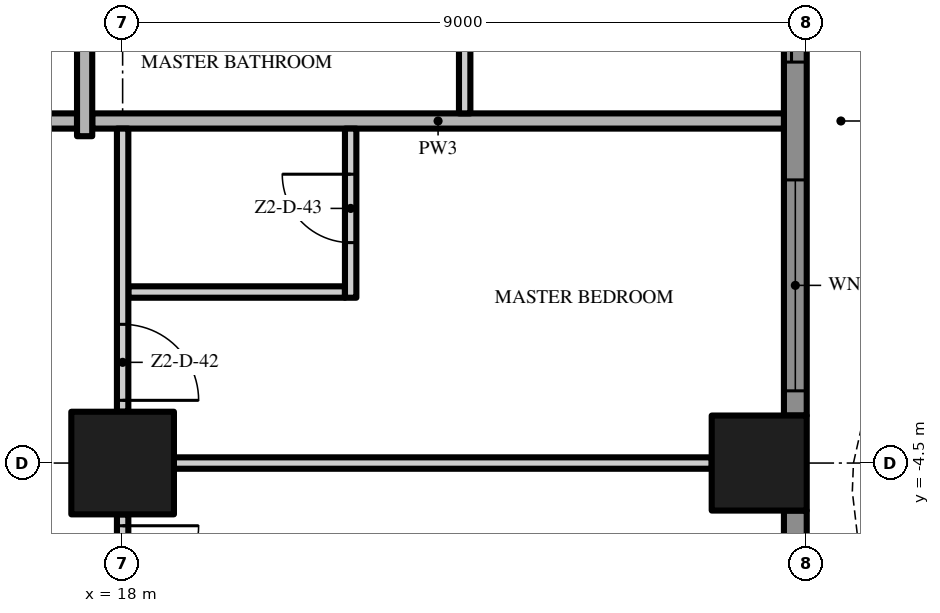
"""IFC4 building model, lengths in metres.
Left out: names, types, materials, properties, quantities, classifications, styles, units other than length and angle.
Written with IfcOpenShell. Run it as: python <this file> out.ifc"""

import sys

from ifc_helpers import new_model, si_unit, direction, frame, frame_2d, origin, origin_2d, place, context, subcontext, project, spatial, polyline, rectangle, outline, extrude, element, fill, save


model = new_model("IFC4")
c1 = context("Model", 3, precision=1e-05, world=origin(), true_north=direction((0.0, 1.0)))
c2 = subcontext(c1, "Body", "Model", "MODEL_VIEW")
j1 = project(units=[si_unit("LENGTHUNIT", "METRE"), si_unit("PLANEANGLEUNIT", "RADIAN")], contexts=[c1])
p1 = place(None, origin())
s1 = spatial("IfcSite", under=j1, at=p1, CompositionType="ELEMENT")
p2 = place(p1, origin())
s2 = spatial("IfcBuilding", under=s1, at=p2, CompositionType="ELEMENT")
p3 = place(p2, frame((0.0, 0.0, 103.6)))
s3 = spatial("IfcBuildingStorey", under=s2, at=p3, CompositionType="ELEMENT", Elevation=103.6)
p4 = place(p3, frame((18.0, -4.5, 0.0), z_axis=(0.0, 0.0, 1.0), x_axis=(1.0, 0.0, 0.0)))
e1 = element("IfcColumn", 1, at=p4, inside=s3, PredefinedType="COLUMN", context=c2, shape_type="SweptSolid", body=[
    extrude(rectangle(XDim=1.35, YDim=1.35, at=origin_2d()), origin(), (0.0, 0.0, 1.0), 3.5),
])
p5 = place(p3, frame((26.375, -4.5, 0.0), z_axis=(0.0, 0.0, 1.0), x_axis=(1.0, 0.0, 0.0)))
e2 = element("IfcColumn", 2, at=p5, inside=s3, PredefinedType="COLUMN", context=c2, shape_type="SweptSolid", body=[
    extrude(rectangle(XDim=1.25, YDim=1.25, at=origin_2d()), origin(), (0.0, 0.0, 1.0), 3.5),
])
p6 = place(p3, frame((26.85, -5.125, 0.0), z_axis=(0.0, 0.0, 1.0), x_axis=(0.0, -1.0, 0.0)))
e3 = element("IfcWall", 3, at=p6, inside=s3, PredefinedType="SOLIDWALL", context=c2, shape_type="SweptSolid", body=[
    extrude(rectangle(XDim=7.75, YDim=0.3, at=frame_2d((3.875, 0.0))), origin(), (0.0, 0.0, 1.0), 3.5),
])
p7 = place(p6, frame((4.65, 0.0, 0.0)))
e4 = element("IfcOpeningElement", 4, at=p7, cuts=e3, PredefinedType="OPENING", context=c2, shape_type="SweptSolid", body=[
    extrude(rectangle(XDim=2.775, YDim=2.4, at=frame_2d((1.387, 1.2))), frame((0.0, 0.16, 0.0), z_axis=(0.0, -1.0, 0.0), x_axis=(1.0, 0.0, 0.0)), (0.0, 0.0, 1.0), 0.32),
])
p8 = place(p6, frame((0.325, 0.0, 0.45)))
e5 = element("IfcOpeningElement", 5, at=p8, cuts=e3, PredefinedType="OPENING", context=c2, shape_type="SweptSolid", body=[
    extrude(rectangle(XDim=2.775, YDim=2.65, at=frame_2d((1.387, 1.325))), frame((0.0, 0.16, 0.0), z_axis=(0.0, -1.0, 0.0), x_axis=(1.0, 0.0, 0.0)), (0.0, 0.0, 1.0), 0.32),
])
p9 = place(p3, frame((26.85, 3.875, 0.0), z_axis=(0.0, 0.0, 1.0), x_axis=(0.0, -1.0, 0.0)))
e6 = element("IfcWall", 6, at=p9, inside=s3, PredefinedType="SOLIDWALL", context=c2, shape_type="SweptSolid", body=[
    extrude(rectangle(XDim=7.75, YDim=0.3, at=frame_2d((3.875, 0.0))), origin(), (0.0, 0.0, 1.0), 3.5),
])
p10 = place(p9, frame((4.65, 0.0, 0.45)))
e7 = element("IfcOpeningElement", 7, at=p10, cuts=e6, PredefinedType="OPENING", context=c2, shape_type="SweptSolid", body=[
    extrude(rectangle(XDim=2.775, YDim=2.65, at=frame_2d((1.387, 1.325))), frame((0.0, 0.16, 0.0), z_axis=(0.0, -1.0, 0.0), x_axis=(1.0, 0.0, 0.0)), (0.0, 0.0, 1.0), 0.32),
])
p11 = place(p9, frame((0.325, 0.0, 0.0)))
e8 = element("IfcOpeningElement", 8, at=p11, cuts=e6, PredefinedType="OPENING", context=c2, shape_type="SweptSolid", body=[
    extrude(rectangle(XDim=2.775, YDim=2.4, at=frame_2d((1.387, 1.2))), frame((0.0, 0.16, 0.0), z_axis=(0.0, -1.0, 0.0), x_axis=(1.0, 0.0, 0.0)), (0.0, 0.0, 1.0), 0.32),
])
p12 = place(p3, origin())
e9 = element("IfcWall", 9, at=p12, inside=s3, PredefinedType="USERDEFINED", context=c2, shape_type="SweptSolid", body=[
    extrude(outline(polyline([(27.951, -18.0), (28.612, -16.5), (29.345, -15.0), (29.869, -13.5), (30.0, -12.375), (29.985, -12.0), (29.649, -10.5), (28.988, -9.0), (28.255, -7.5), (27.731, -6.0), (27.6, -4.875), (27.615, -4.5), (27.951, -3.0), (28.612, -1.5), (29.345, 0.0), (29.869, 1.5), (30.0, 2.625), (29.985, 3.0), (29.649, 4.5), (28.988, 6.0), (28.255, 7.5), (27.731, 9.0), (27.6, 10.125), (27.615, 10.5), (27.951, 12.0), (28.612, 13.5), (29.345, 15.0), (29.869, 16.5), (30.0, 17.625), (29.985, 18.0), (29.735, 17.99), (29.749, 17.635), (29.624, 16.556), (29.114, 15.096), (28.385, 13.605), (27.713, 12.079), (27.366, 10.533), (27.349, 10.115), (27.486, 8.944), (28.024, 7.404), (28.761, 5.895), (29.41, 4.421), (29.736, 2.967), (29.749, 2.635), (29.624, 1.556), (29.114, 0.096), (28.385, -1.395), (27.713, -2.921), (27.366, -4.467), (27.349, -4.885), (27.486, -6.056), (28.024, -7.596), (28.761, -9.105), (29.41, -10.579), (29.736, -12.033), (29.749, -12.365), (29.624, -13.444), (29.114, -14.904), (28.385, -16.395), (27.723, -17.899), (27.951, -18.0)])), origin(), (0.0, 0.0, 1.0), 0.9),
])
p13 = place(p3, frame((18.675, -4.5, 0.0), z_axis=(0.0, 0.0, 1.0), x_axis=(1.0, 0.0, 0.0)))
e10 = element("IfcWall", 10, at=p13, inside=s3, PredefinedType="PARTITIONING", context=c2, shape_type="SweptSolid", body=[
    extrude(rectangle(XDim=7.075, YDim=0.15, at=frame_2d((3.538, 0.0))), origin(), (0.0, 0.0, 1.0), 3.5),
])
p14 = place(p3, frame((18.075, -2.25, 0.0), z_axis=(0.0, 0.0, 1.0), x_axis=(1.0, 0.0, 0.0)))
e11 = element("IfcWall", 11, at=p14, inside=s3, PredefinedType="PARTITIONING", context=c2, shape_type="SweptSolid", body=[
    extrude(rectangle(XDim=2.85, YDim=0.15, at=frame_2d((1.425, 0.0))), origin(), (0.0, 0.0, 1.0), 3.5),
])
p15 = place(p3, frame((4.6, 0.0, 0.0), z_axis=(0.0, 0.0, 1.0), x_axis=(1.0, 0.0, 0.0)))
e12 = element("IfcWall", 12, at=p15, inside=s3, PredefinedType="PARTITIONING", context=c2, shape_type="SweptSolid", body=[
    extrude(rectangle(XDim=12.8, YDim=0.2, at=frame_2d((6.4, 0.0))), origin(), (0.0, 0.0, 1.0), 3.5),
])
p16 = place(p3, frame((17.6, 0.0, 0.0), z_axis=(0.0, 0.0, 1.0), x_axis=(1.0, 0.0, 0.0)))
e13 = element("IfcWall", 13, at=p16, inside=s3, PredefinedType="PARTITIONING", context=c2, shape_type="SweptSolid", body=[
    extrude(rectangle(XDim=9.1, YDim=0.2, at=frame_2d((4.55, 0.0))), origin(), (0.0, 0.0, 1.0), 3.5),
])
p17 = place(p3, frame((17.5, -0.2, 0.0), z_axis=(0.0, 0.0, 1.0), x_axis=(0.0, 1.0, 0.0)))
e14 = element("IfcWall", 14, at=p17, inside=s3, PredefinedType="PARTITIONING", context=c2, shape_type="SweptSolid", body=[
    extrude(rectangle(XDim=4.025, YDim=0.2, at=frame_2d((2.013, 0.0))), origin(), (0.0, 0.0, 1.0), 3.5),
])
p18 = place(p3, frame((18.0, -5.175, 0.0), z_axis=(0.0, 0.0, 1.0), x_axis=(0.0, -1.0, 0.0)))
e15 = element("IfcWall", 15, at=p18, inside=s3, PredefinedType="PARTITIONING", context=c2, shape_type="SweptSolid", body=[
    extrude(rectangle(XDim=7.65, YDim=0.15, at=frame_2d((3.825, 0.0))), origin(), (0.0, 0.0, 1.0), 3.5),
])
p19 = place(p18, frame((0.15, 0.0, 0.0)))
e16 = element("IfcOpeningElement", 16, at=p19, cuts=e15, PredefinedType="OPENING", context=c2, shape_type="SweptSolid", body=[
    extrude(rectangle(XDim=1.0, YDim=2.4, at=frame_2d((0.5, 1.2))), frame((0.0, 0.085, 0.0), z_axis=(0.0, -1.0, 0.0), x_axis=(1.0, 0.0, 0.0)), (0.0, 0.0, 1.0), 0.17),
])
p20 = place(p18, frame((6.5, 0.0, 0.0)))
e17 = element("IfcOpeningElement", 17, at=p20, cuts=e15, PredefinedType="OPENING", context=c2, shape_type="SweptSolid", body=[
    extrude(rectangle(XDim=1.0, YDim=2.4, at=frame_2d((0.5, 1.2))), frame((0.0, 0.085, 0.0), z_axis=(0.0, -1.0, 0.0), x_axis=(1.0, 0.0, 0.0)), (0.0, 0.0, 1.0), 0.17),
])
p21 = place(p3, frame((18.0, -0.1, 0.0), z_axis=(0.0, 0.0, 1.0), x_axis=(0.0, -1.0, 0.0)))
e18 = element("IfcWall", 18, at=p21, inside=s3, PredefinedType="PARTITIONING", context=c2, shape_type="SweptSolid", body=[
    extrude(rectangle(XDim=3.725, YDim=0.15, at=frame_2d((1.863, 0.0))), origin(), (0.0, 0.0, 1.0), 3.5),
])
p22 = place(p21, frame((2.575, 0.0, 0.0)))
e19 = element("IfcOpeningElement", 19, at=p22, cuts=e18, PredefinedType="OPENING", context=c2, shape_type="SweptSolid", body=[
    extrude(rectangle(XDim=1.0, YDim=2.4, at=frame_2d((0.5, 1.2))), frame((0.0, 0.085, 0.0), z_axis=(0.0, -1.0, 0.0), x_axis=(1.0, 0.0, 0.0)), (0.0, 0.0, 1.0), 0.17),
])
p23 = place(p3, frame((21.0, -2.325, 0.0), z_axis=(0.0, 0.0, 1.0), x_axis=(0.0, 1.0, 0.0)))
e20 = element("IfcWall", 20, at=p23, inside=s3, PredefinedType="PARTITIONING", context=c2, shape_type="SweptSolid", body=[
    extrude(rectangle(XDim=2.225, YDim=0.15, at=frame_2d((1.113, 0.0))), origin(), (0.0, 0.0, 1.0), 3.5),
])
p24 = place(p23, frame((0.725, 0.0, 0.0)))
e21 = element("IfcOpeningElement", 21, at=p24, cuts=e20, PredefinedType="OPENING", context=c2, shape_type="SweptSolid", body=[
    extrude(rectangle(XDim=0.9, YDim=2.1, at=frame_2d((0.45, 1.05))), frame((0.0, 0.085, 0.0), z_axis=(0.0, -1.0, 0.0), x_axis=(1.0, 0.0, 0.0)), (0.0, 0.0, 1.0), 0.17),
])
p25 = place(p3, frame((22.5, 17.375, 0.0), z_axis=(0.0, 0.0, 1.0), x_axis=(0.0, -1.0, 0.0)))
e22 = element("IfcWall", 22, at=p25, inside=s3, PredefinedType="PARTITIONING", context=c2, shape_type="SweptSolid", body=[
    extrude(rectangle(XDim=17.275, YDim=0.15, at=frame_2d((8.637, 0.0))), origin(), (0.0, 0.0, 1.0), 3.5),
])
p26 = place(p25, frame((14.625, 0.0, 0.0)))
e23 = element("IfcOpeningElement", 23, at=p26, cuts=e22, PredefinedType="OPENING", context=c2, shape_type="SweptSolid", body=[
    extrude(rectangle(XDim=1.0, YDim=2.4, at=frame_2d((0.5, 1.2))), frame((0.0, 0.085, 0.0), z_axis=(0.0, -1.0, 0.0), x_axis=(1.0, 0.0, 0.0)), (0.0, 0.0, 1.0), 0.17),
])
p27 = place(p25, frame((9.025, 0.0, 0.0)))
e24 = element("IfcOpeningElement", 24, at=p27, cuts=e22, PredefinedType="OPENING", context=c2, shape_type="SweptSolid", body=[
    extrude(rectangle(XDim=1.0, YDim=2.4, at=frame_2d((0.5, 1.2))), frame((0.0, 0.085, 0.0), z_axis=(0.0, -1.0, 0.0), x_axis=(1.0, 0.0, 0.0)), (0.0, 0.0, 1.0), 0.17),
])
p28 = place(p25, frame((6.775, 0.0, 0.0)))
e25 = element("IfcOpeningElement", 25, at=p28, cuts=e22, PredefinedType="OPENING", context=c2, shape_type="SweptSolid", body=[
    extrude(rectangle(XDim=1.0, YDim=2.4, at=frame_2d((0.5, 1.2))), frame((0.0, 0.085, 0.0), z_axis=(0.0, -1.0, 0.0), x_axis=(1.0, 0.0, 0.0)), (0.0, 0.0, 1.0), 0.17),
])
p29 = place(p25, frame((0.15, 0.0, 0.0)))
e26 = element("IfcOpeningElement", 26, at=p29, cuts=e22, PredefinedType="OPENING", context=c2, shape_type="SweptSolid", body=[
    extrude(rectangle(XDim=1.0, YDim=2.4, at=frame_2d((0.5, 1.2))), frame((0.0, 0.085, 0.0), z_axis=(0.0, -1.0, 0.0), x_axis=(1.0, 0.0, 0.0)), (0.0, 0.0, 1.0), 0.17),
])
p30 = place(p10, origin())
e27 = element("IfcWindow", 27, at=p30, inside=s3, PartitioningType="SINGLE_PANEL", PredefinedType="WINDOW", context=c2, shape_type="SweptSolid", body=[
    extrude(rectangle(XDim=2.775, YDim=2.65, at=frame_2d((1.387, 1.325))), frame((0.0, 0.03, 0.0), z_axis=(0.0, -1.0, 0.0), x_axis=(1.0, 0.0, 0.0)), (0.0, 0.0, 1.0), 0.06),
])
fill(e7, e27)
p31 = place(p11, origin())
e28 = element("IfcDoor", 28, at=p31, inside=s3, OperationType="SINGLE_SWING_LEFT", PredefinedType="DOOR", context=c2, shape_type="SweptSolid", body=[
    extrude(rectangle(XDim=2.775, YDim=2.4, at=frame_2d((1.387, 1.2))), frame((0.0, 0.025, 0.0), z_axis=(0.0, -1.0, 0.0), x_axis=(1.0, 0.0, 0.0)), (0.0, 0.0, 1.0), 0.05),
])
fill(e8, e28)
p32 = place(p22, origin())
e29 = element("IfcDoor", 29, at=p32, inside=s3, OperationType="SINGLE_SWING_RIGHT", PredefinedType="DOOR", context=c2, shape_type="SweptSolid", body=[
    extrude(rectangle(XDim=1.0, YDim=2.4, at=frame_2d((0.5, 1.2))), frame((0.0, 0.025, 0.0), z_axis=(0.0, -1.0, 0.0), x_axis=(1.0, 0.0, 0.0)), (0.0, 0.0, 1.0), 0.05),
])
fill(e19, e29)
p33 = place(p24, origin())
e30 = element("IfcDoor", 30, at=p33, inside=s3, OperationType="SINGLE_SWING_RIGHT", PredefinedType="DOOR", context=c2, shape_type="SweptSolid", body=[
    extrude(rectangle(XDim=0.9, YDim=2.1, at=frame_2d((0.45, 1.05))), frame((0.0, 0.025, 0.0), z_axis=(0.0, -1.0, 0.0), x_axis=(1.0, 0.0, 0.0)), (0.0, 0.0, 1.0), 0.05),
])
fill(e21, e30)
p34 = place(p19, origin())
e31 = element("IfcDoor", 31, at=p34, inside=s3, OperationType="SINGLE_SWING_LEFT", PredefinedType="DOOR", context=c2, shape_type="SweptSolid", body=[
    extrude(rectangle(XDim=1.0, YDim=2.4, at=frame_2d((0.5, 1.2))), frame((0.0, 0.025, 0.0), z_axis=(0.0, -1.0, 0.0), x_axis=(1.0, 0.0, 0.0)), (0.0, 0.0, 1.0), 0.05),
])
fill(e16, e31)
save(model, sys.argv[1])
